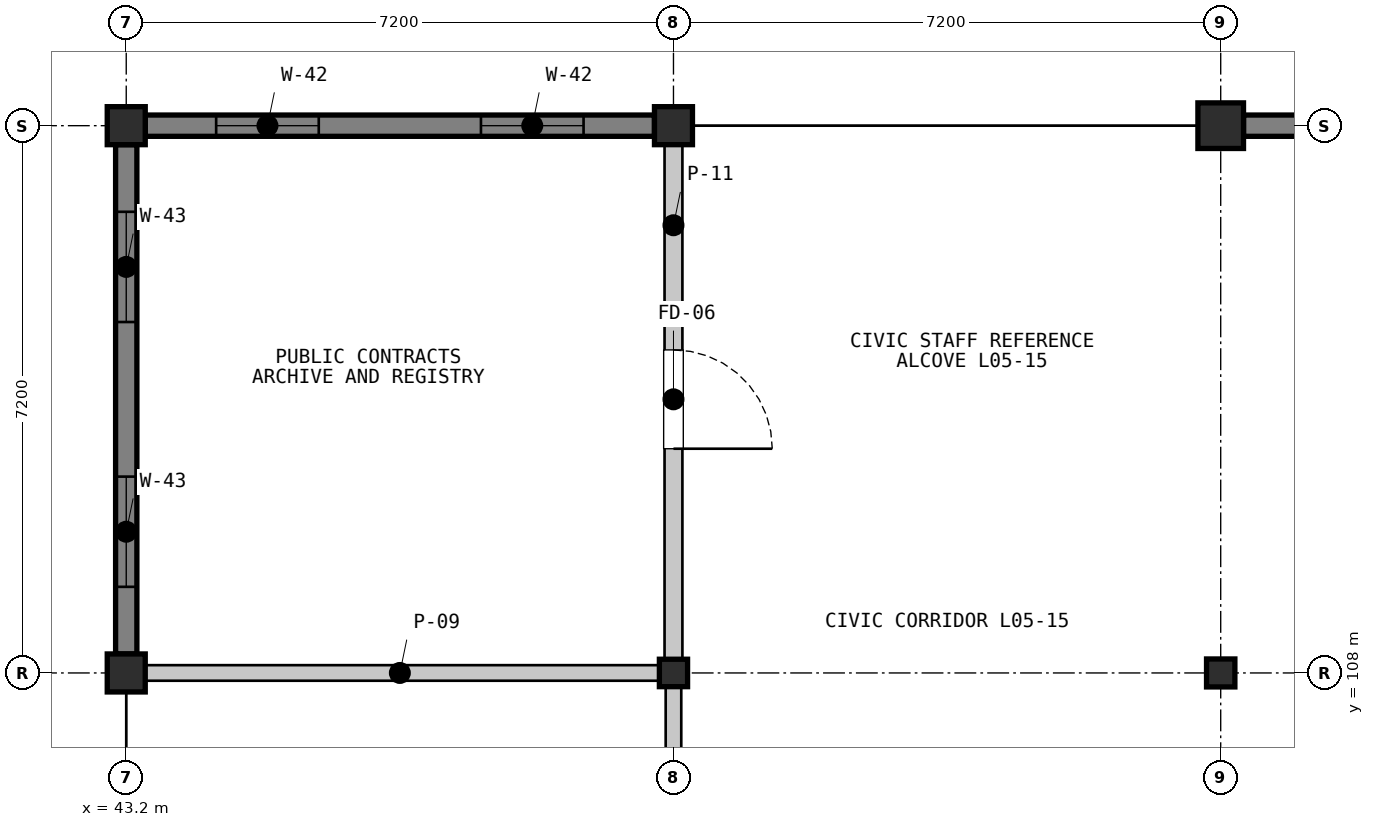
"""IFC4 building model, lengths in metres.
Left out: names, types, materials, properties, quantities, classifications, styles, units other than length and angle.
Written with IfcOpenShell. Run it as: python <this file> out.ifc"""

import sys

from ifc_helpers import new_model, si_unit, direction, frame, frame_2d, origin, origin_2d, place, context, subcontext, project, spatial, rectangle, i_section, extrude, element, fill, save


model = new_model("IFC4")
c1 = context("Model", 3, precision=1e-05, world=origin(), true_north=direction((0.0, 1.0)))
c2 = subcontext(c1, "Body", "Model", "MODEL_VIEW")
j1 = project(units=[si_unit("LENGTHUNIT", "METRE"), si_unit("PLANEANGLEUNIT", "RADIAN")], contexts=[c1])
p1 = place(None, origin())
s1 = spatial("IfcSite", under=j1, at=p1, CompositionType="ELEMENT")
p2 = place(p1, origin())
s2 = spatial("IfcBuilding", under=s1, at=p2, CompositionType="ELEMENT")
p3 = place(p2, frame((0.0, 0.0, 18.0)))
s3 = spatial("IfcBuildingStorey", under=s2, at=p3, CompositionType="ELEMENT", Elevation=18.0)
for number, where, z_axis, x_axis in (
    (1, (43.2, 108.0, 0.0), (0.0, 0.0, 1.0), (1.0, 0.0, 0.0)),
    (2, (43.2, 115.2, 0.0), (0.0, 0.0, 1.0), (1.0, 0.0, 0.0)),
):
    element("IfcColumn", number, at=place(p3, frame(where, z_axis=z_axis, x_axis=x_axis)), inside=s3, PredefinedType="COLUMN", context=c2, shape_type="SweptSolid", body=[
        extrude(rectangle(XDim=0.5, YDim=0.5, at=origin_2d()), origin(), (0.0, 0.0, 1.0), 3.9),
    ])
p4 = place(p3, frame((50.4, 108.0, 0.0), z_axis=(0.0, 0.0, 1.0), x_axis=(1.0, 0.0, 0.0)))
e3 = element("IfcColumn", 3, at=p4, inside=s3, PredefinedType="COLUMN", context=c2, shape_type="SweptSolid", body=[
    extrude(i_section(OverallWidth=0.371, OverallDepth=0.361, WebThickness=0.012, FlangeThickness=0.02, FilletRadius=0.015, at=origin_2d()), origin(), (0.0, 0.0, 1.0), 3.9),
])
p5 = place(p3, frame((50.4, 115.2, 0.0), z_axis=(0.0, 0.0, 1.0), x_axis=(1.0, 0.0, 0.0)))
e4 = element("IfcColumn", 4, at=p5, inside=s3, PredefinedType="COLUMN", context=c2, shape_type="SweptSolid", body=[
    extrude(rectangle(XDim=0.5, YDim=0.5, at=origin_2d()), origin(), (0.0, 0.0, 1.0), 3.9),
])
p6 = place(p3, frame((57.6, 108.0, 0.0), z_axis=(0.0, 0.0, 1.0), x_axis=(1.0, 0.0, 0.0)))
e5 = element("IfcColumn", 5, at=p6, inside=s3, PredefinedType="COLUMN", context=c2, shape_type="SweptSolid", body=[
    extrude(i_section(OverallWidth=0.373, OverallDepth=0.368, WebThickness=0.015, FlangeThickness=0.024, FilletRadius=0.015, at=origin_2d()), origin(), (0.0, 0.0, 1.0), 3.9),
])
p7 = place(p3, frame((57.6, 115.2, 0.0), z_axis=(0.0, 0.0, 1.0), x_axis=(1.0, 0.0, 0.0)))
e6 = element("IfcColumn", 6, at=p7, inside=s3, PredefinedType="COLUMN", context=c2, shape_type="SweptSolid", body=[
    extrude(rectangle(XDim=0.6, YDim=0.6, at=origin_2d()), origin(), (0.0, 0.0, 1.0), 3.9),
])
p8 = place(p3, frame((43.45, 115.2, 0.0), z_axis=(0.0, 0.0, 1.0), x_axis=(1.0, 0.0, 0.0)))
e7 = element("IfcWall", 7, at=p8, inside=s3, PredefinedType="SOLIDWALL", context=c2, shape_type="SweptSolid", body=[
    extrude(rectangle(XDim=6.7, YDim=0.28, at=frame_2d((3.35, 0.0))), origin(), (0.0, 0.0, 1.0), 3.172),
])
p9 = place(p8, frame((0.933, 0.0, 0.95)))
e8 = element("IfcOpeningElement", 8, at=p9, cuts=e7, PredefinedType="OPENING", context=c2, shape_type="SweptSolid", body=[
    extrude(rectangle(XDim=1.35, YDim=1.85, at=frame_2d((0.675, 0.925))), frame((0.0, 0.15, 0.0), z_axis=(0.0, -1.0, 0.0), x_axis=(1.0, 0.0, 0.0)), (0.0, 0.0, 1.0), 0.3),
])
p10 = place(p8, frame((4.417, 0.0, 0.95)))
e9 = element("IfcOpeningElement", 9, at=p10, cuts=e7, PredefinedType="OPENING", context=c2, shape_type="SweptSolid", body=[
    extrude(rectangle(XDim=1.35, YDim=1.85, at=frame_2d((0.675, 0.925))), frame((0.0, 0.15, 0.0), z_axis=(0.0, -1.0, 0.0), x_axis=(1.0, 0.0, 0.0)), (0.0, 0.0, 1.0), 0.3),
])
p11 = place(p3, frame((43.2, 108.25, 0.0), z_axis=(0.0, 0.0, 1.0), x_axis=(0.0, 1.0, 0.0)))
e10 = element("IfcWall", 10, at=p11, inside=s3, PredefinedType="SOLIDWALL", context=c2, shape_type="SweptSolid", body=[
    extrude(rectangle(XDim=6.7, YDim=0.28, at=frame_2d((3.35, 0.0))), origin(), (0.0, 0.0, 1.0), 3.172),
])
p12 = place(p11, frame((0.883, 0.0, 0.95)))
e11 = element("IfcOpeningElement", 11, at=p12, cuts=e10, PredefinedType="OPENING", context=c2, shape_type="SweptSolid", body=[
    extrude(rectangle(XDim=1.45, YDim=1.85, at=frame_2d((0.725, 0.925))), frame((0.0, 0.15, 0.0), z_axis=(0.0, -1.0, 0.0), x_axis=(1.0, 0.0, 0.0)), (0.0, 0.0, 1.0), 0.3),
])
p13 = place(p11, frame((4.367, 0.0, 0.95)))
e12 = element("IfcOpeningElement", 12, at=p13, cuts=e10, PredefinedType="OPENING", context=c2, shape_type="SweptSolid", body=[
    extrude(rectangle(XDim=1.45, YDim=1.85, at=frame_2d((0.725, 0.925))), frame((0.0, 0.15, 0.0), z_axis=(0.0, -1.0, 0.0), x_axis=(1.0, 0.0, 0.0)), (0.0, 0.0, 1.0), 0.3),
])
p14 = place(p3, frame((57.9, 115.2, 0.0), z_axis=(0.0, 0.0, 1.0), x_axis=(1.0, 0.0, 0.0)))
e13 = element("IfcWall", 13, at=p14, inside=s3, PredefinedType="SOLIDWALL", context=c2, shape_type="SweptSolid", body=[
    extrude(rectangle(XDim=6.6, YDim=0.28, at=frame_2d((3.3, 0.0))), origin(), (0.0, 0.0, 1.0), 3.192),
])
for number, where, z_axis, x_axis in (
    (14, (43.32, 108.0, 0.0), (0.0, 0.0, 1.0), (1.0, 0.0, 0.0)),
    (15, (50.4, 107.88, 0.0), (0.0, 0.0, 1.0), (0.0, -1.0, 0.0)),
):
    element("IfcWall", number, at=place(p3, frame(where, z_axis=z_axis, x_axis=x_axis)), inside=s3, PredefinedType="PARTITIONING", context=c2, shape_type="SweptSolid", body=[
        extrude(rectangle(XDim=6.96, YDim=0.205, at=frame_2d((3.48, 0.0))), origin(), (0.0, 0.0, 1.0), 3.088),
    ])
p15 = place(p3, frame((50.4, 115.08, 0.0), z_axis=(0.0, 0.0, 1.0), x_axis=(0.0, -1.0, 0.0)))
e16 = element("IfcWall", 16, at=p15, inside=s3, PredefinedType="PARTITIONING", context=c2, shape_type="SweptSolid", body=[
    extrude(rectangle(XDim=6.96, YDim=0.235, at=frame_2d((3.48, 0.0))), origin(), (0.0, 0.0, 1.0), 3.088),
])
p16 = place(p15, frame((2.83, 0.0, 0.0)))
e17 = element("IfcOpeningElement", 17, at=p16, cuts=e16, PredefinedType="OPENING", context=c2, shape_type="SweptSolid", body=[
    extrude(rectangle(XDim=1.3, YDim=2.2, at=frame_2d((0.65, 1.1))), frame((0.0, 0.127, 0.0), z_axis=(0.0, -1.0, 0.0), x_axis=(1.0, 0.0, 0.0)), (0.0, 0.0, 1.0), 0.255),
])
p17 = place(p9, origin())
e18 = element("IfcWindow", 18, at=p17, inside=s3, PartitioningType="SINGLE_PANEL", PredefinedType="WINDOW", context=c2, shape_type="SweptSolid", body=[
    extrude(rectangle(XDim=1.35, YDim=1.85, at=frame_2d((0.675, 0.925))), frame((0.0, 0.03, 0.0), z_axis=(0.0, -1.0, 0.0), x_axis=(1.0, 0.0, 0.0)), (0.0, 0.0, 1.0), 0.06),
])
fill(e8, e18)
p18 = place(p10, origin())
e19 = element("IfcWindow", 19, at=p18, inside=s3, PartitioningType="SINGLE_PANEL", PredefinedType="WINDOW", context=c2, shape_type="SweptSolid", body=[
    extrude(rectangle(XDim=1.35, YDim=1.85, at=frame_2d((0.675, 0.925))), frame((0.0, 0.03, 0.0), z_axis=(0.0, -1.0, 0.0), x_axis=(1.0, 0.0, 0.0)), (0.0, 0.0, 1.0), 0.06),
])
fill(e9, e19)
p19 = place(p12, origin())
e20 = element("IfcWindow", 20, at=p19, inside=s3, PartitioningType="SINGLE_PANEL", PredefinedType="WINDOW", context=c2, shape_type="SweptSolid", body=[
    extrude(rectangle(XDim=1.45, YDim=1.85, at=frame_2d((0.725, 0.925))), frame((0.0, 0.03, 0.0), z_axis=(0.0, -1.0, 0.0), x_axis=(1.0, 0.0, 0.0)), (0.0, 0.0, 1.0), 0.06),
])
fill(e11, e20)
p20 = place(p13, origin())
e21 = element("IfcWindow", 21, at=p20, inside=s3, PartitioningType="SINGLE_PANEL", PredefinedType="WINDOW", context=c2, shape_type="SweptSolid", body=[
    extrude(rectangle(XDim=1.45, YDim=1.85, at=frame_2d((0.725, 0.925))), frame((0.0, 0.03, 0.0), z_axis=(0.0, -1.0, 0.0), x_axis=(1.0, 0.0, 0.0)), (0.0, 0.0, 1.0), 0.06),
])
fill(e12, e21)
p21 = place(p16, origin())
e22 = element("IfcDoor", 22, at=p21, inside=s3, OperationType="SINGLE_SWING_RIGHT", PredefinedType="DOOR", context=c2, shape_type="SweptSolid", body=[
    extrude(rectangle(XDim=1.3, YDim=2.2, at=frame_2d((0.65, 1.1))), frame((0.0, 0.025, 0.0), z_axis=(0.0, -1.0, 0.0), x_axis=(1.0, 0.0, 0.0)), (0.0, 0.0, 1.0), 0.05),
])
fill(e17, e22)
save(model, sys.argv[1])
